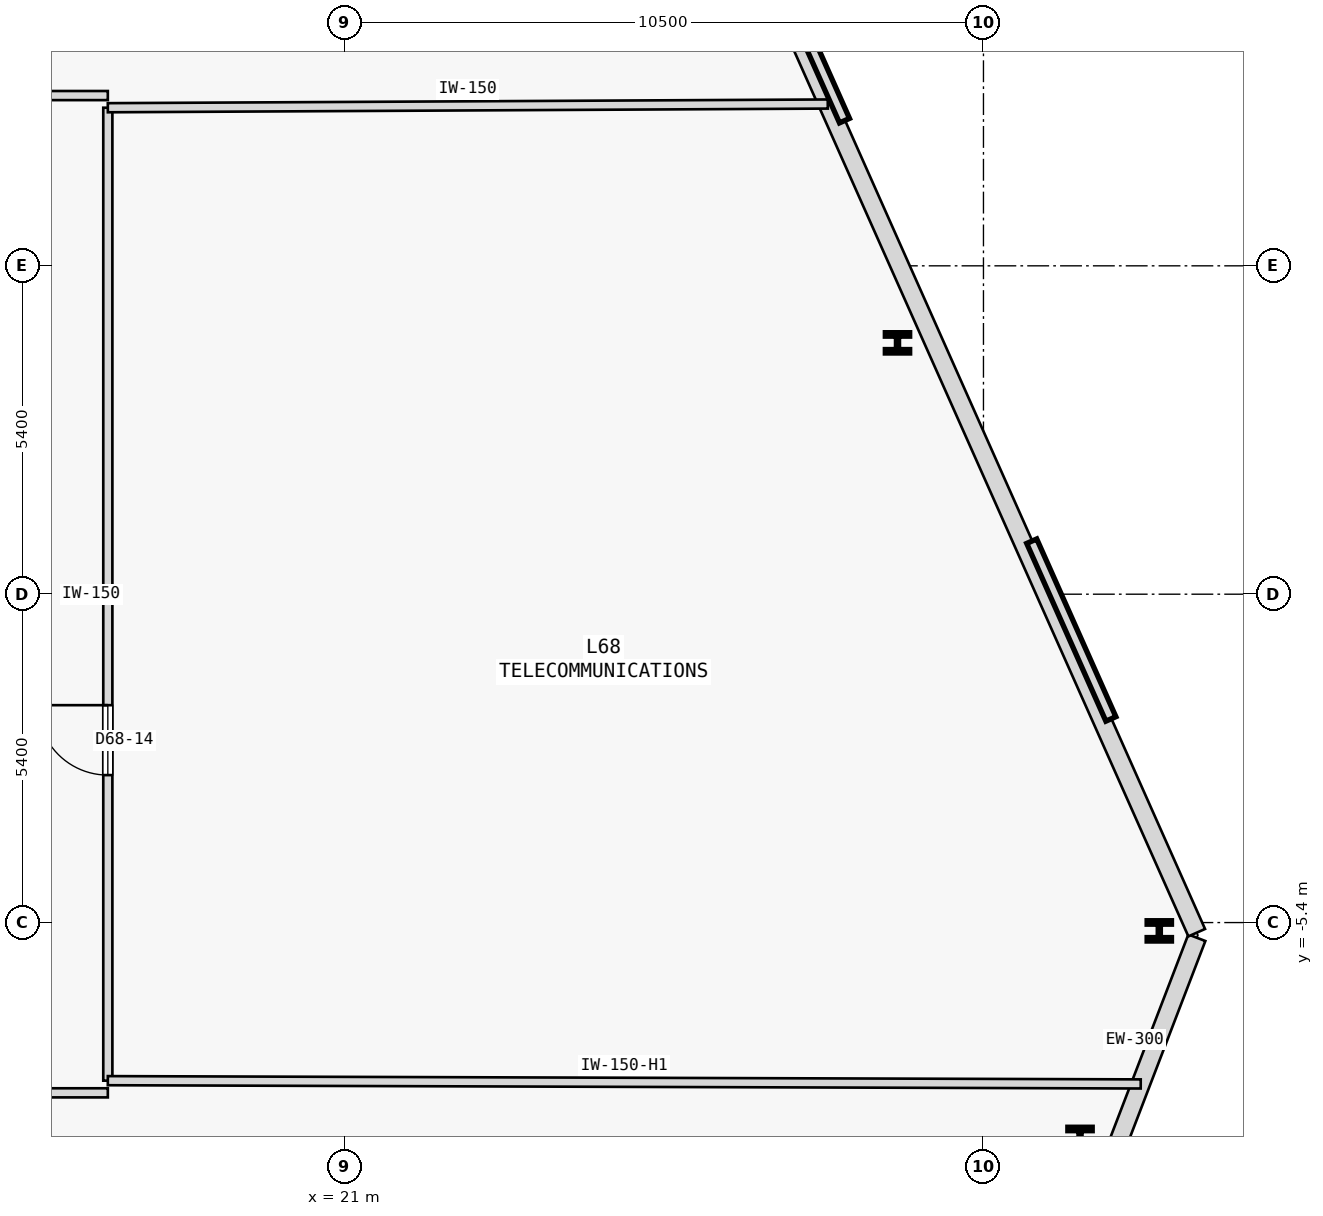
"""IFC4 building model, lengths in metres.
Left out: names, types, materials, properties, quantities, classifications, styles, units other than length and angle.
Written with IfcOpenShell. Run it as: python <this file> out.ifc"""

import sys

from ifc_helpers import new_model, si_unit, direction, frame, frame_2d, origin, origin_2d, place, context, subcontext, project, spatial, rectangle, i_section, extrude, element, fill, save


model = new_model("IFC4")
c1 = context("Model", 3, precision=1e-05, world=origin(), true_north=direction((0.0, 1.0)))
c2 = subcontext(c1, "Body", "Model", "MODEL_VIEW")
j1 = project(units=[si_unit("LENGTHUNIT", "METRE"), si_unit("PLANEANGLEUNIT", "RADIAN")], contexts=[c1])
p1 = place(None, origin())
s1 = spatial("IfcSite", under=j1, at=p1, CompositionType="ELEMENT")
p2 = place(p1, origin())
s2 = spatial("IfcBuilding", under=s1, at=p2, CompositionType="ELEMENT")
p3 = place(p2, frame((0.0, 0.0, 254.45)))
s3 = spatial("IfcBuildingStorey", under=s2, at=p3, CompositionType="ELEMENT", Elevation=254.45)
for number, where, z_axis, x_axis in (
    (1, (33.088, -8.933, 0.0), (0.0, 0.0, 1.0), (1.0, 0.0, 0.0)),
    (2, (34.392, -5.537, 0.0), (0.0, 0.0, 1.0), (1.0, 0.0, 0.0)),
    (3, (30.086, 4.133, 0.0), (0.0, 0.0, 1.0), (1.0, 0.0, 0.0)),
):
    element("IfcColumn", number, at=place(p3, frame(where, z_axis=z_axis, x_axis=x_axis)), inside=s3, PredefinedType="COLUMN", context=c2, shape_type="SweptSolid", body=[
        extrude(i_section(OverallWidth=0.401, OverallDepth=0.335, WebThickness=0.036, FlangeThickness=0.058, FilletRadius=0.015, at=origin_2d()), origin(), (0.0, 0.0, 1.0), 4.4),
    ])
p4 = place(p3, frame((33.622, -9.262, 0.0), z_axis=(0.0, 0.0, 1.0), x_axis=(0.358344855618, 0.933589291098, 0.0)))
e4 = element("IfcWall", 4, at=p4, inside=s3, PredefinedType="STANDARD", context=c2, shape_type="SweptSolid", body=[
    extrude(rectangle(XDim=3.87, YDim=0.3, at=frame_2d((1.935, 0.0))), origin(), (0.0, 0.0, 1.0), 4.175),
])
p5 = place(p3, frame((35.007, -5.566, 0.0), z_axis=(0.0, 0.0, 1.0), x_axis=(-0.406735709426, 0.91354587333, 0.0)))
e5 = element("IfcWall", 5, at=p5, inside=s3, PredefinedType="STANDARD", context=c2, shape_type="SweptSolid", body=[
    extrude(rectangle(XDim=32.31, YDim=0.3, at=frame_2d((16.155, 0.0))), origin(), (0.0, 0.0, 1.0), 4.175),
])
p6 = place(p3, frame((18.109, 25.392, 0.0), z_axis=(0.0, 0.0, 1.0), x_axis=(-0.913544894419, -0.406737908095, 0.0)))
e6 = element("IfcWall", 6, at=p6, inside=s3, PredefinedType="STANDARD", context=c2, shape_type="SweptSolid", body=[
    extrude(rectangle(XDim=51.31, YDim=0.3, at=frame_2d((25.655, 0.0))), origin(), (0.0, 0.0, 1.0), 4.175),
])
p7 = place(p6, frame((27.87, 0.0, 0.0)))
e7 = element("IfcOpeningElement", 7, at=p7, cuts=e6, PredefinedType="OPENING", context=c2, shape_type="SweptSolid", body=[
    extrude(rectangle(XDim=1.1, YDim=2.2, at=frame_2d((0.55, 1.1))), frame((0.0, 0.16, 0.0), z_axis=(0.0, -1.0, 0.0), x_axis=(1.0, 0.0, 0.0)), (0.0, 0.0, 1.0), 0.32),
])
p8 = place(p3, frame((-4.7, 8.2, 0.0), z_axis=(0.0, 0.0, 1.0), x_axis=(1.0, 0.0, 0.0)))
e8 = element("IfcWall", 8, at=p8, inside=s3, PredefinedType="PARTITIONING", context=c2, shape_type="SweptSolid", body=[
    extrude(rectangle(XDim=21.8, YDim=0.15, at=frame_2d((10.9, 0.0))), origin(), (0.0, 0.0, 1.0), 4.175),
])
p9 = place(p8, frame((10.325, 0.0, 0.0)))
e9 = element("IfcOpeningElement", 9, at=p9, cuts=e8, PredefinedType="OPENING", context=c2, shape_type="SweptSolid", body=[
    extrude(rectangle(XDim=1.15, YDim=2.15, at=frame_2d((0.575, 1.075))), frame((0.0, 0.085, 0.0), z_axis=(0.0, -1.0, 0.0), x_axis=(1.0, 0.0, 0.0)), (0.0, 0.0, 1.0), 0.17),
])
p10 = place(p3, frame((5.2, -8.2, 0.0), z_axis=(0.0, 0.0, 1.0), x_axis=(1.0, 0.0, 0.0)))
e10 = element("IfcWall", 10, at=p10, inside=s3, PredefinedType="PARTITIONING", context=c2, shape_type="SweptSolid", body=[
    extrude(rectangle(XDim=11.9, YDim=0.15, at=frame_2d((5.95, 0.0))), origin(), (0.0, 0.0, 1.0), 4.175),
])
p11 = place(p10, frame((7.16, 0.0, 0.0)))
e11 = element("IfcOpeningElement", 11, at=p11, cuts=e10, PredefinedType="OPENING", context=c2, shape_type="SweptSolid", body=[
    extrude(rectangle(XDim=1.15, YDim=2.15, at=frame_2d((0.575, 1.075))), frame((0.0, 0.085, 0.0), z_axis=(0.0, -1.0, 0.0), x_axis=(1.0, 0.0, 0.0)), (0.0, 0.0, 1.0), 0.17),
])
p12 = place(p3, frame((17.1, -8.0, 0.0), z_axis=(0.0, 0.0, 1.0), x_axis=(0.0, 1.0, 0.0)))
e12 = element("IfcWall", 12, at=p12, inside=s3, PredefinedType="PARTITIONING", context=c2, shape_type="SweptSolid", body=[
    extrude(rectangle(XDim=16.0, YDim=0.15, at=frame_2d((8.0, 0.0))), origin(), (0.0, 0.0, 1.0), 4.175),
])
p13 = place(p12, frame((5.025, 0.0, 0.0)))
e13 = element("IfcOpeningElement", 13, at=p13, cuts=e12, PredefinedType="OPENING", context=c2, shape_type="SweptSolid", body=[
    extrude(rectangle(XDim=1.15, YDim=2.15, at=frame_2d((0.575, 1.075))), frame((0.0, 0.085, 0.0), z_axis=(0.0, -1.0, 0.0), x_axis=(1.0, 0.0, 0.0)), (0.0, 0.0, 1.0), 0.17),
])
p14 = place(p3, frame((17.1, 8.0, 0.0), z_axis=(0.0, 0.0, 1.0), x_axis=(0.999986818459, 0.005134482272, 0.0)))
e14 = element("IfcWall", 14, at=p14, inside=s3, PredefinedType="PARTITIONING", context=c2, shape_type="SweptSolid", body=[
    extrude(rectangle(XDim=11.84, YDim=0.15, at=frame_2d((5.92, 0.0))), origin(), (0.0, 0.0, 1.0), 4.175),
])
p15 = place(p3, frame((17.1, -8.0, 0.0), z_axis=(0.0, 0.0, 1.0), x_axis=(0.999995000741, -0.003162039528, 0.0)))
e15 = element("IfcWall", 15, at=p15, inside=s3, PredefinedType="PARTITIONING", context=c2, shape_type="SweptSolid", body=[
    extrude(rectangle(XDim=16.986, YDim=0.15, at=frame_2d((8.493, 0.0))), origin(), (0.0, 0.0, 1.0), 3.725),
])
p16 = place(p13, origin())
e16 = element("IfcDoor", 16, at=p16, inside=s3, OperationType="SINGLE_SWING_RIGHT", PredefinedType="DOOR", context=c2, shape_type="SweptSolid", body=[
    extrude(rectangle(XDim=1.15, YDim=2.15, at=frame_2d((0.575, 1.075))), frame((0.0, 0.025, 0.0), z_axis=(0.0, -1.0, 0.0), x_axis=(1.0, 0.0, 0.0)), (0.0, 0.0, 1.0), 0.05),
])
fill(e13, e16)
save(model, sys.argv[1])
